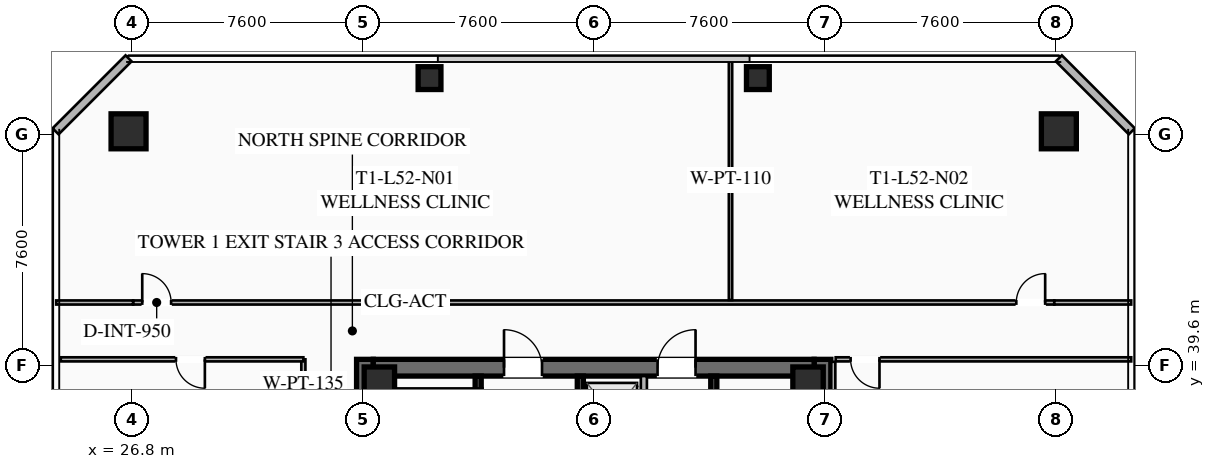
"""IFC4 building model, lengths in metres.
Left out: names, types, materials, properties, quantities, classifications, styles, units other than length and angle.
Written with IfcOpenShell. Run it as: python <this file> out.ifc"""

import sys

from ifc_helpers import new_model, si_unit, direction, frame, frame_2d, origin, origin_2d, place, context, subcontext, project, spatial, rectangle, hollow_rectangle, extrude, element, fill, save


model = new_model("IFC4")
c1 = context("Model", 3, precision=1e-05, world=origin(), true_north=direction((0.0, 1.0)))
c2 = subcontext(c1, "Body", "Model", "MODEL_VIEW")
j1 = project(units=[si_unit("LENGTHUNIT", "METRE"), si_unit("PLANEANGLEUNIT", "RADIAN")], contexts=[c1])
p1 = place(None, origin())
s1 = spatial("IfcSite", under=j1, at=p1, CompositionType="ELEMENT")
p2 = place(p1, origin())
s2 = spatial("IfcBuilding", under=s1, at=p2, CompositionType="ELEMENT")
p3 = place(p2, frame((0.0, 0.0, 192.5)))
s3 = spatial("IfcBuildingStorey", under=s2, at=p3, CompositionType="ELEMENT", Elevation=192.5)
for number, where, z_axis, x_axis in (
    (1, (34.475, 24.2, 0.0), (0.0, 0.0, 1.0), (0.0, 1.0, 0.0)),
    (2, (49.525, 39.8, 0.0), (0.0, 0.0, 1.0), (0.0, -1.0, 0.0)),
):
    element("IfcWall", number, at=place(p3, frame(where, z_axis=z_axis, x_axis=x_axis)), inside=s3, PredefinedType="SHEAR", context=c2, shape_type="SweptSolid", body=[
        extrude(rectangle(XDim=15.6, YDim=0.55, at=frame_2d((7.8, 0.0))), origin(), (0.0, 0.0, 1.0), 3.55),
    ])
p4 = place(p3, frame((34.75, 39.525, 0.0), z_axis=(0.0, 0.0, 1.0), x_axis=(1.0, 0.0, 0.0)))
e3 = element("IfcWall", 3, at=p4, inside=s3, PredefinedType="SHEAR", context=c2, shape_type="SweptSolid", body=[
    extrude(rectangle(XDim=14.5, YDim=0.55, at=frame_2d((7.25, 0.0))), origin(), (0.0, 0.0, 1.0), 3.55),
])
p5 = place(p4, frame((4.3, 0.0, 0.0)))
e4 = element("IfcOpeningElement", 4, at=p5, cuts=e3, PredefinedType="OPENING", context=c2, shape_type="SweptSolid", body=[
    extrude(rectangle(XDim=1.25, YDim=2.25, at=frame_2d((0.625, 1.125))), frame((0.0, 0.285, 0.0), z_axis=(0.0, -1.0, 0.0), x_axis=(1.0, 0.0, 0.0)), (0.0, 0.0, 1.0), 0.57),
])
p6 = place(p4, frame((9.35, 0.0, 0.0)))
e5 = element("IfcOpeningElement", 5, at=p6, cuts=e3, PredefinedType="OPENING", context=c2, shape_type="SweptSolid", body=[
    extrude(rectangle(XDim=1.25, YDim=2.25, at=frame_2d((0.625, 1.125))), frame((0.0, 0.285, 0.0), z_axis=(0.0, -1.0, 0.0), x_axis=(1.0, 0.0, 0.0)), (0.0, 0.0, 1.0), 0.57),
])
for number, where, z_axis, x_axis in (
    (6, (49.05, 39.05, 0.0), (0.0, 0.0, 1.0), (1.0, 0.0, 0.0)),
    (7, (34.95, 39.05, 0.0), (0.0, 0.0, 1.0), (1.0, 0.0, 0.0)),
):
    element("IfcColumn", number, at=place(p3, frame(where, z_axis=z_axis, x_axis=x_axis)), inside=s3, PredefinedType="COLUMN", context=c2, shape_type="SweptSolid", body=[
        extrude(hollow_rectangle(XDim=1.0, YDim=1.0, WallThickness=0.04, at=origin_2d()), origin(), (0.0, 0.0, 1.0), 3.37),
    ])
for number, where, z_axis, x_axis in (
    (8, (57.3, 47.3, 0.0), (0.0, 0.0, 1.0), (1.0, 0.0, 0.0)),
    (9, (26.7, 47.3, 0.0), (0.0, 0.0, 1.0), (1.0, 0.0, 0.0)),
):
    element("IfcColumn", number, at=place(p3, frame(where, z_axis=z_axis, x_axis=x_axis)), inside=s3, PredefinedType="COLUMN", context=c2, shape_type="SweptSolid", body=[
        extrude(hollow_rectangle(XDim=1.15, YDim=1.15, WallThickness=0.045, at=origin_2d()), origin(), (0.0, 0.0, 1.0), 3.37),
    ])
for number, where, z_axis, x_axis in (
    (10, (47.4, 49.05, 0.0), (0.0, 0.0, 1.0), (1.0, 0.0, 0.0)),
    (11, (36.6, 49.05, 0.0), (0.0, 0.0, 1.0), (1.0, 0.0, 0.0)),
):
    element("IfcColumn", number, at=place(p3, frame(where, z_axis=z_axis, x_axis=x_axis)), inside=s3, PredefinedType="COLUMN", context=c2, shape_type="SweptSolid", body=[
        extrude(hollow_rectangle(XDim=0.75, YDim=0.75, WallThickness=0.032, at=origin_2d()), origin(), (0.0, 0.0, 1.0), 3.37),
    ])
for number, where, z_axis, x_axis in (
    (12, (24.3, 47.3, 0.0), (0.0, 0.0, 1.0), (0.707, 0.707, 0.0)),
    (13, (57.3, 49.7, 0.0), (0.0, 0.0, 1.0), (0.707, -0.707, 0.0)),
):
    element("IfcWall", number, at=place(p3, frame(where, z_axis=z_axis, x_axis=x_axis)), inside=s3, PredefinedType="SOLIDWALL", context=c2, shape_type="SweptSolid", body=[
        extrude(rectangle(XDim=3.394, YDim=0.28, at=frame_2d((1.697, 0.0))), origin(), (0.0, 0.0, 1.0), 3.37),
    ])
p7 = place(p3, frame((38.2, 31.2, 0.0), z_axis=(0.0, 0.0, 1.0), x_axis=(0.0, 1.0, 0.0)))
e14 = element("IfcWall", 14, at=p7, inside=s3, PredefinedType="SHEAR", context=c2, shape_type="SweptSolid", body=[
    extrude(rectangle(XDim=8.05, YDim=0.2, at=frame_2d((4.025, 0.0))), origin(), (0.0, 0.0, 1.0), 3.37),
])
p8 = place(p7, frame((0.45, 0.0, 0.0)))
e15 = element("IfcOpeningElement", 15, at=p8, cuts=e14, PredefinedType="OPENING", context=c2, shape_type="SweptSolid", body=[
    extrude(rectangle(XDim=1.15, YDim=2.2, at=frame_2d((0.575, 1.1))), frame((0.0, 0.11, 0.0), z_axis=(0.0, -1.0, 0.0), x_axis=(1.0, 0.0, 0.0)), (0.0, 0.0, 1.0), 0.22),
])
p9 = place(p3, frame((41.56, 24.75, 0.0), z_axis=(0.0, 0.0, 1.0), x_axis=(0.0, 1.0, 0.0)))
e16 = element("IfcWall", 16, at=p9, inside=s3, PredefinedType="SHEAR", context=c2, shape_type="SweptSolid", body=[
    extrude(rectangle(XDim=14.5, YDim=0.2, at=frame_2d((7.25, 0.0))), origin(), (0.0, 0.0, 1.0), 3.37),
])
p10 = place(p3, frame((45.95, 39.25, 0.0), z_axis=(0.0, 0.0, 1.0), x_axis=(0.0, -1.0, 0.0)))
e17 = element("IfcWall", 17, at=p10, inside=s3, PredefinedType="SHEAR", context=c2, shape_type="SweptSolid", body=[
    extrude(rectangle(XDim=6.45, YDim=0.2, at=frame_2d((3.225, 0.0))), origin(), (0.0, 0.0, 1.0), 3.37),
])
p11 = place(p3, frame((43.65, 32.35, 0.0), z_axis=(0.0, 0.0, 1.0), x_axis=(0.0, 1.0, 0.0)))
e18 = element("IfcWall", 18, at=p11, inside=s3, PredefinedType="SOLIDWALL", context=c2, shape_type="SweptSolid", body=[
    extrude(rectangle(XDim=6.9, YDim=0.2, at=frame_2d((3.45, 0.0))), origin(), (0.0, 0.0, 1.0), 3.37),
])
p12 = place(p11, frame((0.575, 0.0, 0.0)))
e19 = element("IfcOpeningElement", 19, at=p12, cuts=e18, PredefinedType="OPENING", context=c2, shape_type="SweptSolid", body=[
    extrude(rectangle(XDim=1.1, YDim=2.2, at=frame_2d((0.55, 1.1))), frame((0.0, 0.11, 0.0), z_axis=(0.0, -1.0, 0.0), x_axis=(1.0, 0.0, 0.0)), (0.0, 0.0, 1.0), 0.22),
])
p13 = place(p11, frame((2.825, 0.0, 0.0)))
e20 = element("IfcOpeningElement", 20, at=p13, cuts=e18, PredefinedType="OPENING", context=c2, shape_type="SweptSolid", body=[
    extrude(rectangle(XDim=1.1, YDim=2.2, at=frame_2d((0.55, 1.1))), frame((0.0, 0.11, 0.0), z_axis=(0.0, -1.0, 0.0), x_axis=(1.0, 0.0, 0.0)), (0.0, 0.0, 1.0), 0.22),
])
p14 = place(p11, frame((5.075, 0.0, 0.0)))
e21 = element("IfcOpeningElement", 21, at=p14, cuts=e18, PredefinedType="OPENING", context=c2, shape_type="SweptSolid", body=[
    extrude(rectangle(XDim=1.1, YDim=2.2, at=frame_2d((0.55, 1.1))), frame((0.0, 0.11, 0.0), z_axis=(0.0, -1.0, 0.0), x_axis=(1.0, 0.0, 0.0)), (0.0, 0.0, 1.0), 0.22),
])
p15 = place(p3, frame((32.45, 35.4, 0.0), z_axis=(0.0, 0.0, 1.0), x_axis=(0.0, 1.0, 0.0)))
e22 = element("IfcWall", 22, at=p15, inside=s3, PredefinedType="PARTITIONING", context=c2, shape_type="SweptSolid", body=[
    extrude(rectangle(XDim=4.4, YDim=0.135, at=frame_2d((2.2, 0.0))), origin(), (0.0, 0.0, 1.0), 2.723),
])
p16 = place(p3, frame((26.85, 41.67, 0.0), z_axis=(0.0, 0.0, 1.0), x_axis=(1.0, 0.0, 0.0)))
e23 = element("IfcWall", 23, at=p16, inside=s3, PredefinedType="PARTITIONING", context=c2, shape_type="SweptSolid", body=[
    extrude(rectangle(XDim=30.3, YDim=0.135, at=frame_2d((15.15, 0.0))), origin(), (0.0, 0.0, 1.0), 2.723),
])
p17 = place(p16, frame((0.3, 0.0, 0.0)))
e24 = element("IfcOpeningElement", 24, at=p17, cuts=e23, PredefinedType="OPENING", context=c2, shape_type="SweptSolid", body=[
    extrude(rectangle(XDim=0.95, YDim=2.05, at=frame_2d((0.475, 1.025))), frame((0.0, 0.077, 0.0), z_axis=(0.0, -1.0, 0.0), x_axis=(1.0, 0.0, 0.0)), (0.0, 0.0, 1.0), 0.155),
])
p18 = place(p16, frame((29.05, 0.0, 0.0)))
e25 = element("IfcOpeningElement", 25, at=p18, cuts=e23, PredefinedType="OPENING", context=c2, shape_type="SweptSolid", body=[
    extrude(rectangle(XDim=0.95, YDim=2.05, at=frame_2d((0.475, 1.025))), frame((0.0, 0.077, 0.0), z_axis=(0.0, -1.0, 0.0), x_axis=(1.0, 0.0, 0.0)), (0.0, 0.0, 1.0), 0.155),
])
for number, where, z_axis, x_axis in (
    (26, (24.32, 41.67, 0.0), (0.0, 0.0, 1.0), (1.0, 0.0, 0.0)),
    (27, (57.15, 41.67, 0.0), (0.0, 0.0, 1.0), (1.0, 0.0, 0.0)),
):
    element("IfcWall", number, at=place(p3, frame(where, z_axis=z_axis, x_axis=x_axis)), inside=s3, PredefinedType="PARTITIONING", context=c2, shape_type="SweptSolid", body=[
        extrude(rectangle(XDim=2.53, YDim=0.135, at=frame_2d((1.265, 0.0))), origin(), (0.0, 0.0, 1.0), 2.723),
    ])
p19 = place(p3, frame((46.5, 41.75, 0.0), z_axis=(0.0, 0.0, 1.0), x_axis=(0.0, 1.0, 0.0)))
e28 = element("IfcWall", 28, at=p19, inside=s3, PredefinedType="PARTITIONING", context=c2, shape_type="SweptSolid", body=[
    extrude(rectangle(XDim=7.93, YDim=0.11, at=frame_2d((3.965, 0.0))), origin(), (0.0, 0.0, 1.0), 2.723),
])
p20 = place(p3, frame((49.88, 39.72, 0.0), z_axis=(0.0, 0.0, 1.0), x_axis=(0.0, -1.0, 0.0)))
e29 = element("IfcWall", 29, at=p20, inside=s3, PredefinedType="PARTITIONING", context=c2, shape_type="SweptSolid", body=[
    extrude(rectangle(XDim=15.44, YDim=0.135, at=frame_2d((7.72, 0.0))), origin(), (0.0, 0.0, 1.0), 2.723),
])
p21 = place(p3, frame((59.68, 39.8, 0.0), z_axis=(0.0, 0.0, 1.0), x_axis=(-1.0, 0.0, 0.0)))
e30 = element("IfcWall", 30, at=p21, inside=s3, PredefinedType="PARTITIONING", context=c2, shape_type="SweptSolid", body=[
    extrude(rectangle(XDim=9.72, YDim=0.135, at=frame_2d((4.86, 0.0))), origin(), (0.0, 0.0, 1.0), 2.723),
])
p22 = place(p21, frame((8.28, 0.0, 0.0)))
e31 = element("IfcOpeningElement", 31, at=p22, cuts=e30, PredefinedType="OPENING", context=c2, shape_type="SweptSolid", body=[
    extrude(rectangle(XDim=0.95, YDim=2.05, at=frame_2d((0.475, 1.025))), frame((0.0, 0.077, 0.0), z_axis=(0.0, -1.0, 0.0), x_axis=(1.0, 0.0, 0.0)), (0.0, 0.0, 1.0), 0.155),
])
p23 = place(p3, frame((32.45, 39.8, 0.0), z_axis=(0.0, 0.0, 1.0), x_axis=(-1.0, 0.0, 0.0)))
e32 = element("IfcWall", 32, at=p23, inside=s3, PredefinedType="PARTITIONING", context=c2, shape_type="SweptSolid", body=[
    extrude(rectangle(XDim=7.98, YDim=0.135, at=frame_2d((3.99, 0.0))), origin(), (0.0, 0.0, 1.0), 2.723),
])
p24 = place(p23, frame((3.24, 0.0, 0.0)))
e33 = element("IfcOpeningElement", 33, at=p24, cuts=e32, PredefinedType="OPENING", context=c2, shape_type="SweptSolid", body=[
    extrude(rectangle(XDim=0.95, YDim=2.05, at=frame_2d((0.475, 1.025))), frame((0.0, 0.077, 0.0), z_axis=(0.0, -1.0, 0.0), x_axis=(1.0, 0.0, 0.0)), (0.0, 0.0, 1.0), 0.155),
])
p25 = place(p5, origin())
e34 = element("IfcDoor", 34, at=p25, inside=s3, OperationType="SINGLE_SWING_LEFT", PredefinedType="DOOR", context=c2, shape_type="SweptSolid", body=[
    extrude(rectangle(XDim=1.25, YDim=2.25, at=frame_2d((0.625, 1.125))), frame((0.0, 0.025, 0.0), z_axis=(0.0, -1.0, 0.0), x_axis=(1.0, 0.0, 0.0)), (0.0, 0.0, 1.0), 0.05),
])
fill(e4, e34)
p26 = place(p6, origin())
e35 = element("IfcDoor", 35, at=p26, inside=s3, OperationType="SINGLE_SWING_RIGHT", PredefinedType="DOOR", context=c2, shape_type="SweptSolid", body=[
    extrude(rectangle(XDim=1.25, YDim=2.25, at=frame_2d((0.625, 1.125))), frame((0.0, 0.025, 0.0), z_axis=(0.0, -1.0, 0.0), x_axis=(1.0, 0.0, 0.0)), (0.0, 0.0, 1.0), 0.05),
])
fill(e5, e35)
p27 = place(p17, origin())
e36 = element("IfcDoor", 36, at=p27, inside=s3, OperationType="SINGLE_SWING_LEFT", PredefinedType="DOOR", context=c2, shape_type="SweptSolid", body=[
    extrude(rectangle(XDim=0.95, YDim=2.05, at=frame_2d((0.475, 1.025))), frame((0.0, 0.025, 0.0), z_axis=(0.0, -1.0, 0.0), x_axis=(1.0, 0.0, 0.0)), (0.0, 0.0, 1.0), 0.05),
])
fill(e24, e36)
p28 = place(p18, origin())
e37 = element("IfcDoor", 37, at=p28, inside=s3, OperationType="SINGLE_SWING_RIGHT", PredefinedType="DOOR", context=c2, shape_type="SweptSolid", body=[
    extrude(rectangle(XDim=0.95, YDim=2.05, at=frame_2d((0.475, 1.025))), frame((0.0, 0.025, 0.0), z_axis=(0.0, -1.0, 0.0), x_axis=(1.0, 0.0, 0.0)), (0.0, 0.0, 1.0), 0.05),
])
fill(e25, e37)
p29 = place(p22, origin())
e38 = element("IfcDoor", 38, at=p29, inside=s3, OperationType="SINGLE_SWING_LEFT", PredefinedType="DOOR", context=c2, shape_type="SweptSolid", body=[
    extrude(rectangle(XDim=0.95, YDim=2.05, at=frame_2d((0.475, 1.025))), frame((0.0, 0.025, 0.0), z_axis=(0.0, -1.0, 0.0), x_axis=(1.0, 0.0, 0.0)), (0.0, 0.0, 1.0), 0.05),
])
fill(e31, e38)
p30 = place(p24, origin())
e39 = element("IfcDoor", 39, at=p30, inside=s3, OperationType="SINGLE_SWING_LEFT", PredefinedType="DOOR", context=c2, shape_type="SweptSolid", body=[
    extrude(rectangle(XDim=0.95, YDim=2.05, at=frame_2d((0.475, 1.025))), frame((0.0, 0.025, 0.0), z_axis=(0.0, -1.0, 0.0), x_axis=(1.0, 0.0, 0.0)), (0.0, 0.0, 1.0), 0.05),
])
fill(e33, e39)
save(model, sys.argv[1])
